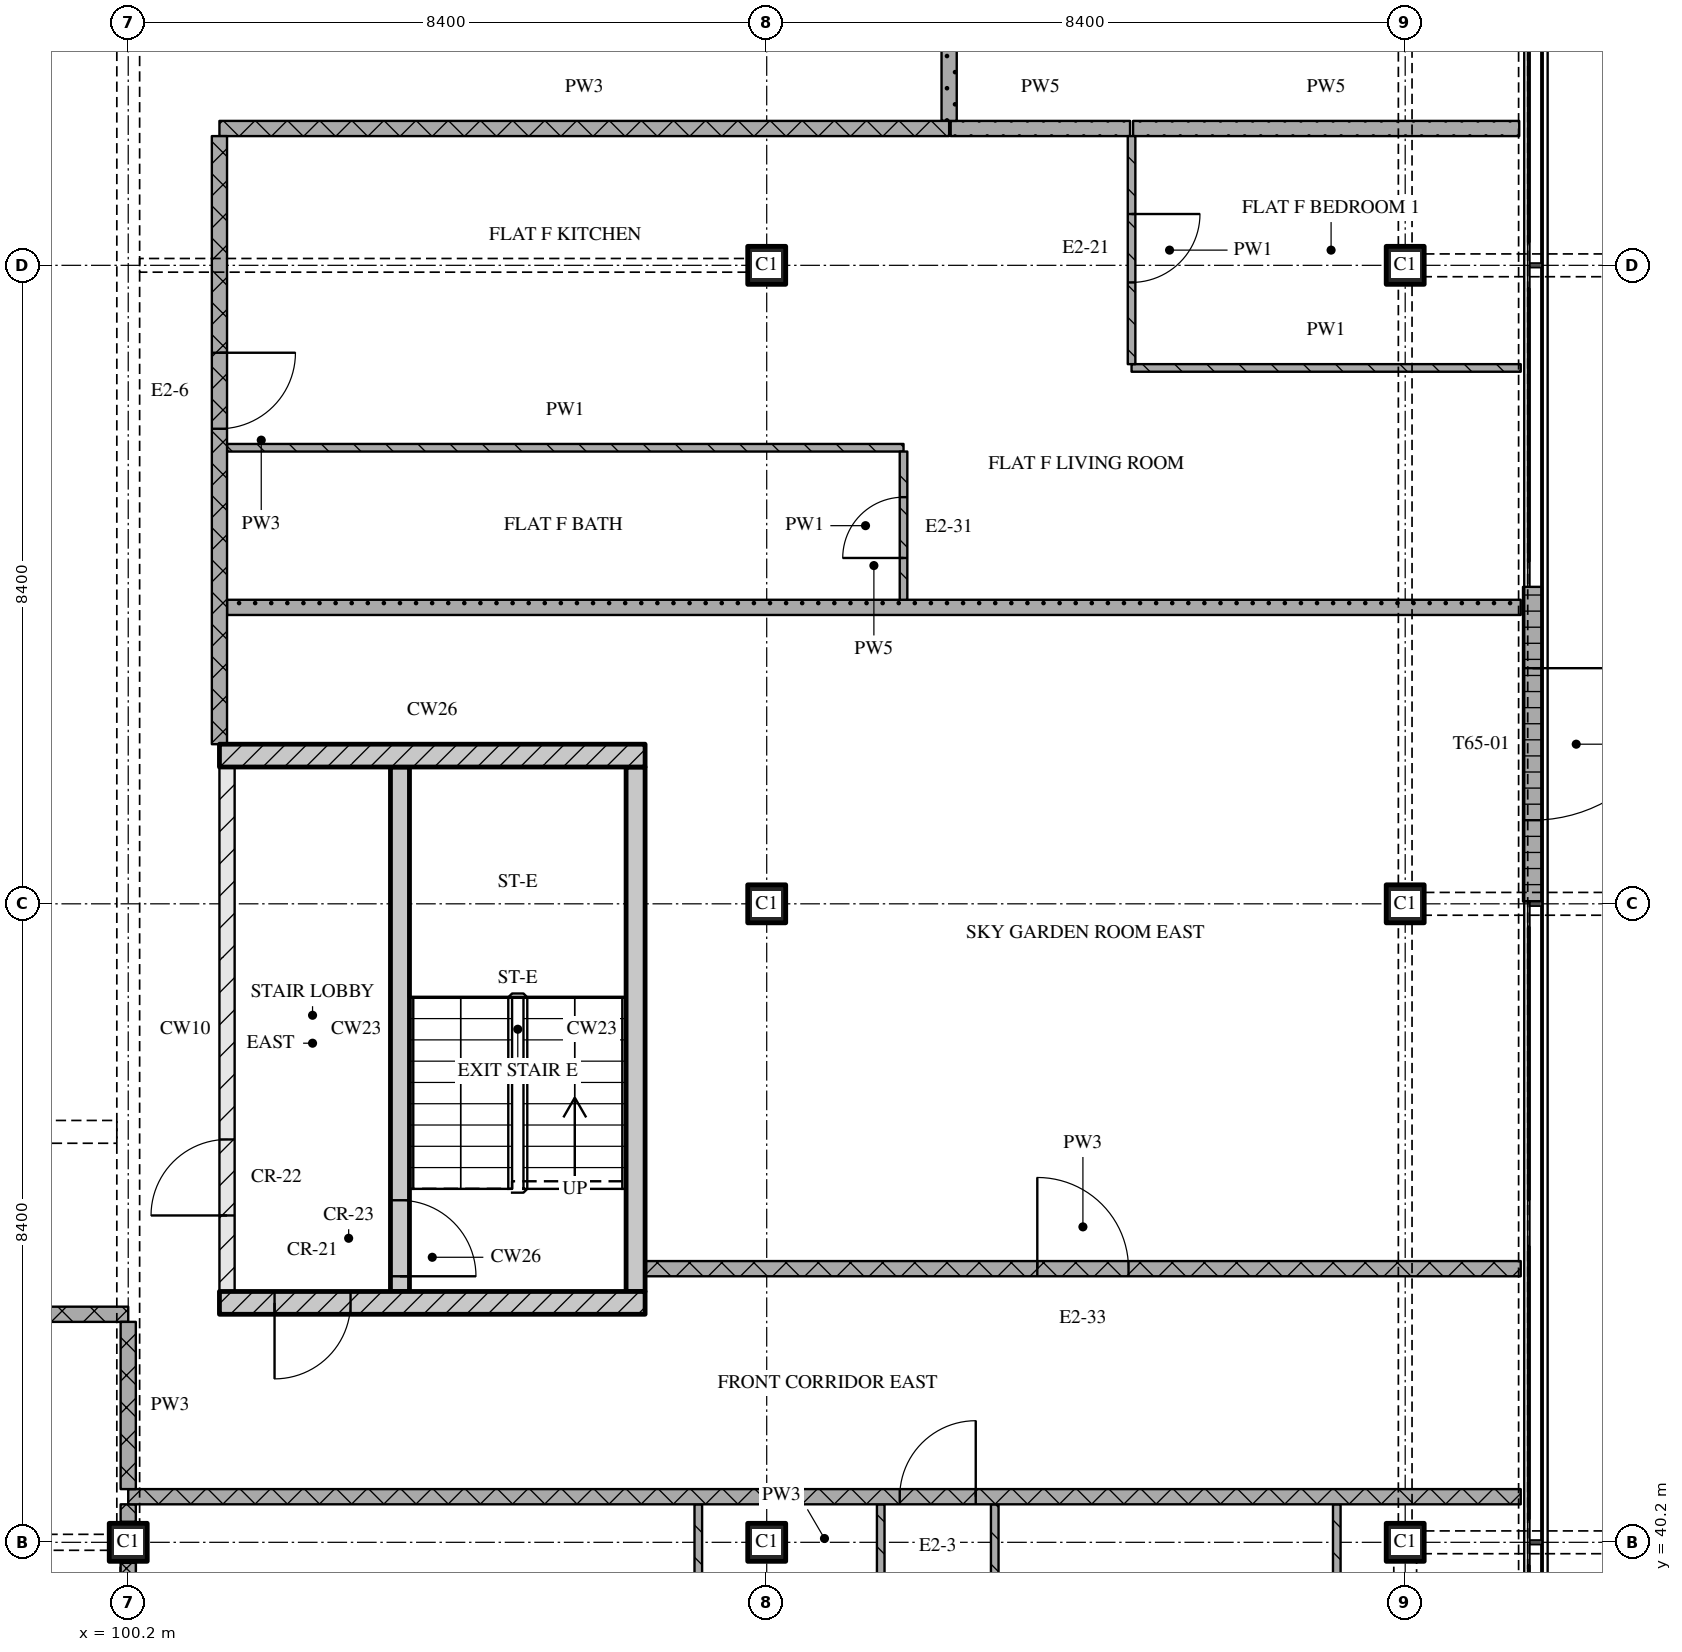
"""IFC4 building model, lengths in metres.
Left out: names, types, materials, properties, quantities, classifications, styles, units other than length and angle.
Written with IfcOpenShell. Run it as: python <this file> out.ifc"""

import sys

from ifc_helpers import new_model, si_unit, direction, frame, frame_2d, origin, origin_2d, place, context, subcontext, project, spatial, rectangle, extrude, element, fill, save


model = new_model("IFC4")
c1 = context("Model", 3, precision=1e-05, world=origin(), true_north=direction((0.0, 1.0)))
c2 = subcontext(c1, "Body", "Model", "MODEL_VIEW")
j1 = project(units=[si_unit("LENGTHUNIT", "METRE"), si_unit("PLANEANGLEUNIT", "RADIAN")], contexts=[c1])
p1 = place(None, origin())
s1 = spatial("IfcSite", under=j1, at=p1, CompositionType="ELEMENT")
p2 = place(p1, origin())
s2 = spatial("IfcBuilding", under=s1, at=p2, CompositionType="ELEMENT")
p3 = place(p2, frame((0.0, 0.0, 270.75)))
s3 = spatial("IfcBuildingStorey", under=s2, at=p3, CompositionType="ELEMENT", Elevation=270.75)
for number, where, z_axis, x_axis in (
    (1, (100.2, 40.2, 0.0), (0.0, 0.0, 1.0), (1.0, 0.0, 0.0)),
    (2, (108.6, 40.2, 0.0), (0.0, 0.0, 1.0), (1.0, 0.0, 0.0)),
    (3, (108.6, 48.6, 0.0), (0.0, 0.0, 1.0), (1.0, 0.0, 0.0)),
    (4, (108.6, 57.0, 0.0), (0.0, 0.0, 1.0), (1.0, 0.0, 0.0)),
    (5, (117.0, 40.2, 0.0), (0.0, 0.0, 1.0), (1.0, 0.0, 0.0)),
    (6, (117.0, 48.6, 0.0), (0.0, 0.0, 1.0), (1.0, 0.0, 0.0)),
    (7, (117.0, 57.0, 0.0), (0.0, 0.0, 1.0), (1.0, 0.0, 0.0)),
):
    element("IfcColumn", number, at=place(p3, frame(where, z_axis=z_axis, x_axis=x_axis)), inside=s3, PredefinedType="COLUMN", context=c2, shape_type="SweptSolid", body=[
        extrude(rectangle(XDim=0.5, YDim=0.5, at=origin_2d()), origin(), (0.0, 0.0, 1.0), 3.6),
    ])
p4 = place(p3, frame((118.675, 52.77, 0.0), z_axis=(0.0, 0.0, 1.0), x_axis=(0.0, -1.0, 0.0)))
e8 = element("IfcWall", 8, at=p4, inside=s3, PredefinedType="SOLIDWALL", context=c2, shape_type="SweptSolid", body=[
    extrude(rectangle(XDim=4.14, YDim=0.25, at=frame_2d((2.07, 0.0))), origin(), (0.0, 0.0, 1.0), 3.32),
])
p5 = place(p4, frame((1.07, 0.0, 0.0)))
e9 = element("IfcOpeningElement", 9, at=p5, cuts=e8, PredefinedType="OPENING", context=c2, shape_type="SweptSolid", body=[
    extrude(rectangle(XDim=2.0, YDim=2.4, at=frame_2d((1.0, 1.2))), frame((0.0, 0.135, 0.0), z_axis=(0.0, -1.0, 0.0), x_axis=(1.0, 0.0, 0.0)), (0.0, 0.0, 1.0), 0.27),
])
p6 = place(p3, frame((101.4, 43.35, 0.0), z_axis=(0.0, 0.0, 1.0), x_axis=(1.0, 0.0, 0.0)))
e10 = element("IfcWall", 10, at=p6, inside=s3, PredefinedType="SOLIDWALL", context=c2, shape_type="SweptSolid", body=[
    extrude(rectangle(XDim=5.6, YDim=0.3, at=frame_2d((2.8, 0.0))), origin(), (0.0, 0.0, 1.0), 3.32),
])
p7 = place(p6, frame((0.725, 0.0, 0.0)))
e11 = element("IfcOpeningElement", 11, at=p7, cuts=e10, PredefinedType="OPENING", context=c2, shape_type="SweptSolid", body=[
    extrude(rectangle(XDim=1.0, YDim=2.1, at=frame_2d((0.5, 1.05))), frame((0.0, 0.16, 0.0), z_axis=(0.0, -1.0, 0.0), x_axis=(1.0, 0.0, 0.0)), (0.0, 0.0, 1.0), 0.32),
])
p8 = place(p3, frame((101.5, 43.5, 0.0), z_axis=(0.0, 0.0, 1.0), x_axis=(0.0, 1.0, 0.0)))
e12 = element("IfcWall", 12, at=p8, inside=s3, PredefinedType="PARTITIONING", context=c2, shape_type="SweptSolid", body=[
    extrude(rectangle(XDim=6.9, YDim=0.2, at=frame_2d((3.45, 0.0))), origin(), (0.0, 0.0, 1.0), 3.32),
])
p9 = place(p8, frame((1.0, 0.0, 0.0)))
e13 = element("IfcOpeningElement", 13, at=p9, cuts=e12, PredefinedType="OPENING", context=c2, shape_type="SweptSolid", body=[
    extrude(rectangle(XDim=1.0, YDim=2.1, at=frame_2d((0.5, 1.05))), frame((0.0, 0.11, 0.0), z_axis=(0.0, -1.0, 0.0), x_axis=(1.0, 0.0, 0.0)), (0.0, 0.0, 1.0), 0.22),
])
p10 = place(p3, frame((103.775, 43.5, 0.0), z_axis=(0.0, 0.0, 1.0), x_axis=(0.0, 1.0, 0.0)))
e14 = element("IfcWall", 14, at=p10, inside=s3, PredefinedType="SOLIDWALL", context=c2, shape_type="SweptSolid", body=[
    extrude(rectangle(XDim=6.9, YDim=0.25, at=frame_2d((3.45, 0.0))), origin(), (0.0, 0.0, 1.0), 3.32),
])
p11 = place(p10, frame((0.2, 0.0, 0.0)))
e15 = element("IfcOpeningElement", 15, at=p11, cuts=e14, PredefinedType="OPENING", context=c2, shape_type="SweptSolid", body=[
    extrude(rectangle(XDim=1.0, YDim=2.1, at=frame_2d((0.5, 1.05))), frame((0.0, 0.135, 0.0), z_axis=(0.0, -1.0, 0.0), x_axis=(1.0, 0.0, 0.0)), (0.0, 0.0, 1.0), 0.27),
])
p12 = place(p3, frame((106.875, 43.5, 0.0), z_axis=(0.0, 0.0, 1.0), x_axis=(0.0, 1.0, 0.0)))
e16 = element("IfcWall", 16, at=p12, inside=s3, PredefinedType="SOLIDWALL", context=c2, shape_type="SweptSolid", body=[
    extrude(rectangle(XDim=6.9, YDim=0.25, at=frame_2d((3.45, 0.0))), origin(), (0.0, 0.0, 1.0), 3.32),
])
p13 = place(p3, frame((101.4, 50.55, 0.0), z_axis=(0.0, 0.0, 1.0), x_axis=(1.0, 0.0, 0.0)))
e17 = element("IfcWall", 17, at=p13, inside=s3, PredefinedType="SOLIDWALL", context=c2, shape_type="SweptSolid", body=[
    extrude(rectangle(XDim=5.6, YDim=0.3, at=frame_2d((2.8, 0.0))), origin(), (0.0, 0.0, 1.0), 3.32),
])
p14 = place(p3, frame((118.52, 40.8, 0.0), z_axis=(0.0, 0.0, 1.0), x_axis=(-1.0, 0.0, 0.0)))
e18 = element("IfcWall", 18, at=p14, inside=s3, PredefinedType="PARTITIONING", context=c2, shape_type="SweptSolid", body=[
    extrude(rectangle(XDim=18.32, YDim=0.2, at=frame_2d((9.16, 0.0))), origin(), (0.0, 0.0, 1.0), 3.32),
])
p15 = place(p14, frame((7.17, 0.0, 0.0)))
e19 = element("IfcOpeningElement", 19, at=p15, cuts=e18, PredefinedType="OPENING", context=c2, shape_type="SweptSolid", body=[
    extrude(rectangle(XDim=1.0, YDim=2.1, at=frame_2d((0.5, 1.05))), frame((0.0, 0.11, 0.0), z_axis=(0.0, -1.0, 0.0), x_axis=(1.0, 0.0, 0.0)), (0.0, 0.0, 1.0), 0.22),
])
p16 = place(p3, frame((100.2, 43.2, 0.0), z_axis=(0.0, 0.0, 1.0), x_axis=(-1.0, 0.0, 0.0)))
e20 = element("IfcWall", 20, at=p16, inside=s3, PredefinedType="PARTITIONING", context=c2, shape_type="SweptSolid", body=[
    extrude(rectangle(XDim=25.2, YDim=0.2, at=frame_2d((12.6, 0.0))), origin(), (0.0, 0.0, 1.0), 3.32),
])
p17 = place(p16, frame((12.55, 0.0, 0.0)))
e21 = element("IfcOpeningElement", 21, at=p17, cuts=e20, PredefinedType="OPENING", context=c2, shape_type="SweptSolid", body=[
    extrude(rectangle(XDim=1.0, YDim=2.1, at=frame_2d((0.5, 1.05))), frame((0.0, 0.11, 0.0), z_axis=(0.0, -1.0, 0.0), x_axis=(1.0, 0.0, 0.0)), (0.0, 0.0, 1.0), 0.22),
])
p18 = place(p3, frame((107.0, 43.8, 0.0), z_axis=(0.0, 0.0, 1.0), x_axis=(1.0, 0.0, 0.0)))
e22 = element("IfcWall", 22, at=p18, inside=s3, PredefinedType="PARTITIONING", context=c2, shape_type="SweptSolid", body=[
    extrude(rectangle(XDim=11.52, YDim=0.2, at=frame_2d((5.76, 0.0))), origin(), (0.0, 0.0, 1.0), 3.32),
])
p19 = place(p18, frame((5.16, 0.0, 0.0)))
e23 = element("IfcOpeningElement", 23, at=p19, cuts=e22, PredefinedType="OPENING", context=c2, shape_type="SweptSolid", body=[
    extrude(rectangle(XDim=1.2, YDim=2.1, at=frame_2d((0.6, 1.05))), frame((0.0, 0.11, 0.0), z_axis=(0.0, -1.0, 0.0), x_axis=(1.0, 0.0, 0.0)), (0.0, 0.0, 1.0), 0.22),
])
p20 = place(p3, frame((101.5, 52.5, 0.0), z_axis=(0.0, 0.0, 1.0), x_axis=(1.0, 0.0, 0.0)))
e24 = element("IfcWall", 24, at=p20, inside=s3, PredefinedType="PARTITIONING", context=c2, shape_type="SweptSolid", body=[
    extrude(rectangle(XDim=17.02, YDim=0.2, at=frame_2d((8.51, 0.0))), origin(), (0.0, 0.0, 1.0), 3.32),
])
p21 = place(p3, frame((101.5, 54.6, 0.0), z_axis=(0.0, 0.0, 1.0), x_axis=(1.0, 0.0, 0.0)))
e25 = element("IfcWall", 25, at=p21, inside=s3, PredefinedType="PARTITIONING", context=c2, shape_type="SweptSolid", body=[
    extrude(rectangle(XDim=8.9, YDim=0.1, at=frame_2d((4.45, 0.0))), origin(), (0.0, 0.0, 1.0), 3.32),
])
p22 = place(p3, frame((113.4, 55.65, 0.0), z_axis=(0.0, 0.0, 1.0), x_axis=(1.0, 0.0, 0.0)))
e26 = element("IfcWall", 26, at=p22, inside=s3, PredefinedType="PARTITIONING", context=c2, shape_type="SweptSolid", body=[
    extrude(rectangle(XDim=5.12, YDim=0.1, at=frame_2d((2.56, 0.0))), origin(), (0.0, 0.0, 1.0), 3.32),
])
p23 = place(p3, frame((101.4, 58.8, 0.0), z_axis=(0.0, 0.0, 1.0), x_axis=(1.0, 0.0, 0.0)))
e27 = element("IfcWall", 27, at=p23, inside=s3, PredefinedType="PARTITIONING", context=c2, shape_type="SweptSolid", body=[
    extrude(rectangle(XDim=9.6, YDim=0.2, at=frame_2d((4.8, 0.0))), origin(), (0.0, 0.0, 1.0), 3.32),
])
p24 = place(p3, frame((111.02, 58.8, 0.0), z_axis=(0.0, 0.0, 1.0), x_axis=(1.0, 0.0, 0.0)))
e28 = element("IfcWall", 28, at=p24, inside=s3, PredefinedType="PARTITIONING", context=c2, shape_type="SweptSolid", body=[
    extrude(rectangle(XDim=2.36, YDim=0.2, at=frame_2d((1.18, 0.0))), origin(), (0.0, 0.0, 1.0), 3.32),
])
p25 = place(p3, frame((113.42, 58.8, 0.0), z_axis=(0.0, 0.0, 1.0), x_axis=(1.0, 0.0, 0.0)))
e29 = element("IfcWall", 29, at=p25, inside=s3, PredefinedType="PARTITIONING", context=c2, shape_type="SweptSolid", body=[
    extrude(rectangle(XDim=5.08, YDim=0.2, at=frame_2d((2.54, 0.0))), origin(), (0.0, 0.0, 1.0), 3.32),
])
p26 = place(p3, frame((100.2, 43.1, 0.0), z_axis=(0.0, 0.0, 1.0), x_axis=(0.0, -1.0, 0.0)))
e30 = element("IfcWall", 30, at=p26, inside=s3, PredefinedType="PARTITIONING", context=c2, shape_type="SweptSolid", body=[
    extrude(rectangle(XDim=2.2, YDim=0.2, at=frame_2d((1.1, 0.0))), origin(), (0.0, 0.0, 1.0), 2.53),
])
p27 = place(p3, frame((100.2, 39.93, 0.0), z_axis=(0.0, 0.0, 1.0), x_axis=(0.0, -1.0, 0.0)))
e31 = element("IfcWall", 31, at=p27, inside=s3, PredefinedType="PARTITIONING", context=c2, shape_type="SweptSolid", body=[
    extrude(rectangle(XDim=7.86, YDim=0.2, at=frame_2d((3.93, 0.0))), origin(), (0.0, 0.0, 1.0), 2.77),
])
p28 = place(p3, frame((100.2, 40.7, 0.0), z_axis=(0.0, 0.0, 1.0), x_axis=(0.0, -1.0, 0.0)))
e32 = element("IfcWall", 32, at=p28, inside=s3, PredefinedType="PARTITIONING", context=c2, shape_type="SweptSolid", body=[
    extrude(rectangle(XDim=0.23, YDim=0.2, at=frame_2d((0.115, 0.0))), origin(), (0.0, 0.0, 1.0), 3.32),
])
p29 = place(p3, frame((101.4, 58.7, 0.0), z_axis=(0.0, 0.0, 1.0), x_axis=(0.0, -1.0, 0.0)))
e33 = element("IfcWall", 33, at=p29, inside=s3, PredefinedType="PARTITIONING", context=c2, shape_type="SweptSolid", body=[
    extrude(rectangle(XDim=8.0, YDim=0.2, at=frame_2d((4.0, 0.0))), origin(), (0.0, 0.0, 1.0), 3.32),
])
p30 = place(p29, frame((2.85, 0.0, 0.0)))
e34 = element("IfcOpeningElement", 34, at=p30, cuts=e33, PredefinedType="OPENING", context=c2, shape_type="SweptSolid", body=[
    extrude(rectangle(XDim=1.0, YDim=2.1, at=frame_2d((0.5, 1.05))), frame((0.0, 0.11, 0.0), z_axis=(0.0, -1.0, 0.0), x_axis=(1.0, 0.0, 0.0)), (0.0, 0.0, 1.0), 0.22),
])
p31 = place(p3, frame((107.7, 40.7, 0.0), z_axis=(0.0, 0.0, 1.0), x_axis=(0.0, -1.0, 0.0)))
e35 = element("IfcWall", 35, at=p31, inside=s3, PredefinedType="PARTITIONING", context=c2, shape_type="SweptSolid", body=[
    extrude(rectangle(XDim=2.85, YDim=0.1, at=frame_2d((1.425, 0.0))), origin(), (0.0, 0.0, 1.0), 3.32),
])
p32 = place(p3, frame((110.1, 37.85, 0.0), z_axis=(0.0, 0.0, 1.0), x_axis=(0.0, 1.0, 0.0)))
e36 = element("IfcWall", 36, at=p32, inside=s3, PredefinedType="PARTITIONING", context=c2, shape_type="SweptSolid", body=[
    extrude(rectangle(XDim=2.85, YDim=0.1, at=frame_2d((1.425, 0.0))), origin(), (0.0, 0.0, 1.0), 3.32),
])
p33 = place(p32, frame((1.0, 0.0, 0.0)))
e37 = element("IfcOpeningElement", 37, at=p33, cuts=e36, PredefinedType="OPENING", context=c2, shape_type="SweptSolid", body=[
    extrude(rectangle(XDim=0.9, YDim=2.1, at=frame_2d((0.45, 1.05))), frame((0.0, 0.06, 0.0), z_axis=(0.0, -1.0, 0.0), x_axis=(1.0, 0.0, 0.0)), (0.0, 0.0, 1.0), 0.12),
])
p34 = place(p3, frame((110.4, 52.6, 0.0), z_axis=(0.0, 0.0, 1.0), x_axis=(0.0, 1.0, 0.0)))
e38 = element("IfcWall", 38, at=p34, inside=s3, PredefinedType="PARTITIONING", context=c2, shape_type="SweptSolid", body=[
    extrude(rectangle(XDim=1.95, YDim=0.1, at=frame_2d((0.975, 0.0))), origin(), (0.0, 0.0, 1.0), 3.32),
])
p35 = place(p34, frame((0.55, 0.0, 0.0)))
e39 = element("IfcOpeningElement", 39, at=p35, cuts=e38, PredefinedType="OPENING", context=c2, shape_type="SweptSolid", body=[
    extrude(rectangle(XDim=0.8, YDim=2.1, at=frame_2d((0.4, 1.05))), frame((0.0, 0.06, 0.0), z_axis=(0.0, -1.0, 0.0), x_axis=(1.0, 0.0, 0.0)), (0.0, 0.0, 1.0), 0.12),
])
p36 = place(p3, frame((111.0, 61.1, 0.0), z_axis=(0.0, 0.0, 1.0), x_axis=(0.0, -1.0, 0.0)))
e40 = element("IfcWall", 40, at=p36, inside=s3, PredefinedType="PARTITIONING", context=c2, shape_type="SweptSolid", body=[
    extrude(rectangle(XDim=2.2, YDim=0.2, at=frame_2d((1.1, 0.0))), origin(), (0.0, 0.0, 1.0), 3.32),
])
p37 = place(p3, frame((111.6, 40.7, 0.0), z_axis=(0.0, 0.0, 1.0), x_axis=(0.0, -1.0, 0.0)))
e41 = element("IfcWall", 41, at=p37, inside=s3, PredefinedType="PARTITIONING", context=c2, shape_type="SweptSolid", body=[
    extrude(rectangle(XDim=2.85, YDim=0.1, at=frame_2d((1.425, 0.0))), origin(), (0.0, 0.0, 1.0), 3.32),
])
p38 = place(p37, frame((1.0, 0.0, 0.0)))
e42 = element("IfcOpeningElement", 42, at=p38, cuts=e41, PredefinedType="OPENING", context=c2, shape_type="SweptSolid", body=[
    extrude(rectangle(XDim=0.8, YDim=2.1, at=frame_2d((0.4, 1.05))), frame((0.0, 0.06, 0.0), z_axis=(0.0, -1.0, 0.0), x_axis=(1.0, 0.0, 0.0)), (0.0, 0.0, 1.0), 0.12),
])
p39 = place(p3, frame((113.4, 58.7, 0.0), z_axis=(0.0, 0.0, 1.0), x_axis=(0.0, -1.0, 0.0)))
e43 = element("IfcWall", 43, at=p39, inside=s3, PredefinedType="PARTITIONING", context=c2, shape_type="SweptSolid", body=[
    extrude(rectangle(XDim=3.0, YDim=0.1, at=frame_2d((1.5, 0.0))), origin(), (0.0, 0.0, 1.0), 3.32),
])
p40 = place(p39, frame((1.025, 0.0, 0.0)))
e44 = element("IfcOpeningElement", 44, at=p40, cuts=e43, PredefinedType="OPENING", context=c2, shape_type="SweptSolid", body=[
    extrude(rectangle(XDim=0.9, YDim=2.1, at=frame_2d((0.45, 1.05))), frame((0.0, 0.06, 0.0), z_axis=(0.0, -1.0, 0.0), x_axis=(1.0, 0.0, 0.0)), (0.0, 0.0, 1.0), 0.12),
])
p41 = place(p3, frame((116.1, 40.7, 0.0), z_axis=(0.0, 0.0, 1.0), x_axis=(0.0, -1.0, 0.0)))
e45 = element("IfcWall", 45, at=p41, inside=s3, PredefinedType="PARTITIONING", context=c2, shape_type="SweptSolid", body=[
    extrude(rectangle(XDim=2.85, YDim=0.1, at=frame_2d((1.425, 0.0))), origin(), (0.0, 0.0, 1.0), 3.32),
])
p42 = place(p5, origin())
e46 = element("IfcDoor", 46, at=p42, inside=s3, OperationType="DOUBLE_DOOR_SINGLE_SWING", PredefinedType="DOOR", context=c2, shape_type="SweptSolid", body=[
    extrude(rectangle(XDim=2.0, YDim=2.4, at=frame_2d((1.0, 1.2))), frame((0.0, 0.025, 0.0), z_axis=(0.0, -1.0, 0.0), x_axis=(1.0, 0.0, 0.0)), (0.0, 0.0, 1.0), 0.05),
])
fill(e9, e46)
p43 = place(p7, origin())
e47 = element("IfcDoor", 47, at=p43, inside=s3, OperationType="SINGLE_SWING_RIGHT", PredefinedType="DOOR", context=c2, shape_type="SweptSolid", body=[
    extrude(rectangle(XDim=1.0, YDim=2.1, at=frame_2d((0.5, 1.05))), frame((0.0, 0.025, 0.0), z_axis=(0.0, -1.0, 0.0), x_axis=(1.0, 0.0, 0.0)), (0.0, 0.0, 1.0), 0.05),
])
fill(e11, e47)
p44 = place(p11, origin())
e48 = element("IfcDoor", 48, at=p44, inside=s3, OperationType="SINGLE_SWING_RIGHT", PredefinedType="DOOR", context=c2, shape_type="SweptSolid", body=[
    extrude(rectangle(XDim=1.0, YDim=2.1, at=frame_2d((0.5, 1.05))), frame((0.0, 0.025, 0.0), z_axis=(0.0, -1.0, 0.0), x_axis=(1.0, 0.0, 0.0)), (0.0, 0.0, 1.0), 0.05),
])
fill(e15, e48)
p45 = place(p9, origin())
e49 = element("IfcDoor", 49, at=p45, inside=s3, OperationType="SINGLE_SWING_LEFT", PredefinedType="DOOR", context=c2, shape_type="SweptSolid", body=[
    extrude(rectangle(XDim=1.0, YDim=2.1, at=frame_2d((0.5, 1.05))), frame((0.0, 0.025, 0.0), z_axis=(0.0, -1.0, 0.0), x_axis=(1.0, 0.0, 0.0)), (0.0, 0.0, 1.0), 0.05),
])
fill(e13, e49)
p46 = place(p15, origin())
e50 = element("IfcDoor", 50, at=p46, inside=s3, OperationType="SINGLE_SWING_RIGHT", PredefinedType="DOOR", context=c2, shape_type="SweptSolid", body=[
    extrude(rectangle(XDim=1.0, YDim=2.1, at=frame_2d((0.5, 1.05))), frame((0.0, 0.025, 0.0), z_axis=(0.0, -1.0, 0.0), x_axis=(1.0, 0.0, 0.0)), (0.0, 0.0, 1.0), 0.05),
])
fill(e19, e50)
p47 = place(p19, origin())
e51 = element("IfcDoor", 51, at=p47, inside=s3, OperationType="SINGLE_SWING_LEFT", PredefinedType="DOOR", context=c2, shape_type="SweptSolid", body=[
    extrude(rectangle(XDim=1.2, YDim=2.1, at=frame_2d((0.6, 1.05))), frame((0.0, 0.025, 0.0), z_axis=(0.0, -1.0, 0.0), x_axis=(1.0, 0.0, 0.0)), (0.0, 0.0, 1.0), 0.05),
])
fill(e23, e51)
p48 = place(p30, origin())
e52 = element("IfcDoor", 52, at=p48, inside=s3, OperationType="SINGLE_SWING_LEFT", PredefinedType="DOOR", context=c2, shape_type="SweptSolid", body=[
    extrude(rectangle(XDim=1.0, YDim=2.1, at=frame_2d((0.5, 1.05))), frame((0.0, 0.025, 0.0), z_axis=(0.0, -1.0, 0.0), x_axis=(1.0, 0.0, 0.0)), (0.0, 0.0, 1.0), 0.05),
])
fill(e34, e52)
p49 = place(p35, origin())
e53 = element("IfcDoor", 53, at=p49, inside=s3, OperationType="SINGLE_SWING_LEFT", PredefinedType="DOOR", context=c2, shape_type="SweptSolid", body=[
    extrude(rectangle(XDim=0.8, YDim=2.1, at=frame_2d((0.4, 1.05))), frame((0.0, 0.025, 0.0), z_axis=(0.0, -1.0, 0.0), x_axis=(1.0, 0.0, 0.0)), (0.0, 0.0, 1.0), 0.05),
])
fill(e39, e53)
p50 = place(p40, origin())
e54 = element("IfcDoor", 54, at=p50, inside=s3, OperationType="SINGLE_SWING_LEFT", PredefinedType="DOOR", context=c2, shape_type="SweptSolid", body=[
    extrude(rectangle(XDim=0.9, YDim=2.1, at=frame_2d((0.45, 1.05))), frame((0.0, 0.025, 0.0), z_axis=(0.0, -1.0, 0.0), x_axis=(1.0, 0.0, 0.0)), (0.0, 0.0, 1.0), 0.05),
])
fill(e44, e54)
save(model, sys.argv[1])
